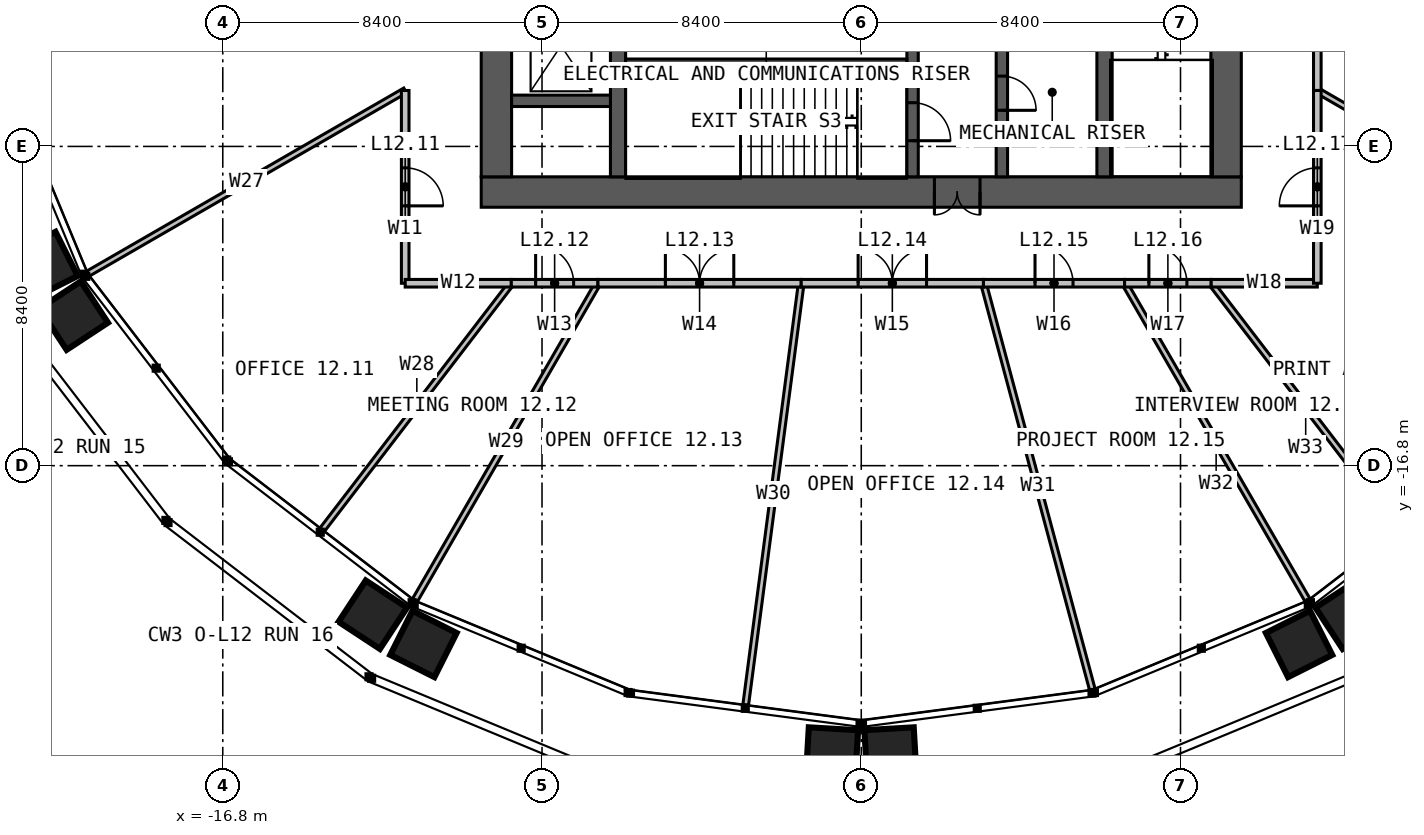
"""IFC4 building model, lengths in metres.
Left out: names, types, materials, properties, quantities, classifications, styles, units other than length and angle.
Written with IfcOpenShell. Run it as: python <this file> out.ifc"""

import sys

from ifc_helpers import new_model, si_unit, direction, frame, frame_2d, origin, place, context, subcontext, project, spatial, rectangle, extrude, element, fill, save


model = new_model("IFC4")
c1 = context("Model", 3, precision=1e-05, world=origin(), true_north=direction((0.0, 1.0)))
c2 = subcontext(c1, "Body", "Model", "MODEL_VIEW")
j1 = project(units=[si_unit("LENGTHUNIT", "METRE"), si_unit("PLANEANGLEUNIT", "RADIAN")], contexts=[c1])
p1 = place(None, origin())
s1 = spatial("IfcSite", under=j1, at=p1, CompositionType="ELEMENT")
p2 = place(p1, origin())
s2 = spatial("IfcBuilding", under=s1, at=p2, CompositionType="ELEMENT")
p3 = place(p2, frame((0.0, 0.0, 53.0)))
s3 = spatial("IfcBuildingStorey", under=s2, at=p3, CompositionType="ELEMENT", Elevation=53.0)
p4 = place(p3, frame((10.0, -9.6, 0.0), z_axis=(0.0, 0.0, 1.0), x_axis=(-1.0, 0.0, 0.0)))
e1 = element("IfcWall", 1, at=p4, inside=s3, PredefinedType="SOLIDWALL", context=c2, shape_type="SweptSolid", body=[
    extrude(rectangle(XDim=20.0, YDim=0.8, at=frame_2d((10.0, 0.0))), origin(), (0.0, 0.0, 1.0), 4.0),
])
p5 = place(p4, frame((6.875, 0.0, 0.0)))
e2 = element("IfcOpeningElement", 2, at=p5, cuts=e1, PredefinedType="OPENING", context=c2, shape_type="SweptSolid", body=[
    extrude(rectangle(XDim=1.2, YDim=2.2, at=frame_2d((0.6, 1.1))), frame((0.0, 0.41, 0.0), z_axis=(0.0, -1.0, 0.0), x_axis=(1.0, 0.0, 0.0)), (0.0, 0.0, 1.0), 0.82),
])
for number, where, z_axis, x_axis in (
    (3, (9.6, -9.2, 0.0), (0.0, 0.0, 1.0), (0.0, 1.0, 0.0)),
    (4, (-9.6, 9.2, 0.0), (0.0, 0.0, 1.0), (0.0, -1.0, 0.0)),
):
    element("IfcWall", number, at=place(p3, frame(where, z_axis=z_axis, x_axis=x_axis)), inside=s3, PredefinedType="SOLIDWALL", context=c2, shape_type="SweptSolid", body=[
        extrude(rectangle(XDim=18.4, YDim=0.8, at=frame_2d((9.2, 0.0))), origin(), (0.0, 0.0, 1.0), 4.0),
    ])
p6 = place(p3, frame((-6.4, -9.2, 0.0), z_axis=(0.0, 0.0, 1.0), x_axis=(0.0, 1.0, 0.0)))
e5 = element("IfcWall", 5, at=p6, inside=s3, PredefinedType="SOLIDWALL", context=c2, shape_type="SweptSolid", body=[
    extrude(rectangle(XDim=18.4, YDim=0.4, at=frame_2d((9.2, 0.0))), origin(), (0.0, 0.0, 1.0), 4.0),
])
p7 = place(p6, frame((8.7, 0.0, 0.0)))
e6 = element("IfcOpeningElement", 6, at=p7, cuts=e5, PredefinedType="OPENING", context=c2, shape_type="SweptSolid", body=[
    extrude(rectangle(XDim=1.0, YDim=2.2, at=frame_2d((0.5, 1.1))), frame((0.0, 0.21, 0.0), z_axis=(0.0, -1.0, 0.0), x_axis=(1.0, 0.0, 0.0)), (0.0, 0.0, 1.0), 0.42),
])
p8 = place(p3, frame((6.4, 9.2, 0.0), z_axis=(0.0, 0.0, 1.0), x_axis=(0.0, -1.0, 0.0)))
e7 = element("IfcWall", 7, at=p8, inside=s3, PredefinedType="SOLIDWALL", context=c2, shape_type="SweptSolid", body=[
    extrude(rectangle(XDim=18.4, YDim=0.4, at=frame_2d((9.2, 0.0))), origin(), (0.0, 0.0, 1.0), 4.0),
])
p9 = place(p8, frame((8.7, 0.0, 0.0)))
e8 = element("IfcOpeningElement", 8, at=p9, cuts=e7, PredefinedType="OPENING", context=c2, shape_type="SweptSolid", body=[
    extrude(rectangle(XDim=1.0, YDim=2.2, at=frame_2d((0.5, 1.1))), frame((0.0, 0.21, 0.0), z_axis=(0.0, -1.0, 0.0), x_axis=(1.0, 0.0, 0.0)), (0.0, 0.0, 1.0), 0.42),
])
p10 = place(p3, frame((1.35, -1.45, 0.0), z_axis=(0.0, 0.0, 1.0), x_axis=(0.0, -1.0, 0.0)))
e9 = element("IfcWall", 9, at=p10, inside=s3, PredefinedType="SOLIDWALL", context=c2, shape_type="SweptSolid", body=[
    extrude(rectangle(XDim=7.75, YDim=0.3, at=frame_2d((3.875, 0.0))), origin(), (0.0, 0.0, 1.0), 4.0),
])
p11 = place(p10, frame((5.8, 0.0, 0.0)))
e10 = element("IfcOpeningElement", 10, at=p11, cuts=e9, PredefinedType="OPENING", context=c2, shape_type="SweptSolid", body=[
    extrude(rectangle(XDim=1.0, YDim=2.2, at=frame_2d((0.5, 1.1))), frame((0.0, 0.16, 0.0), z_axis=(0.0, -1.0, 0.0), x_axis=(1.0, 0.0, 0.0)), (0.0, 0.0, 1.0), 0.32),
])
p12 = place(p10, frame((3.525, 0.0, 0.0)))
e11 = element("IfcOpeningElement", 11, at=p12, cuts=e9, PredefinedType="OPENING", context=c2, shape_type="SweptSolid", body=[
    extrude(rectangle(XDim=0.9, YDim=2.2, at=frame_2d((0.45, 1.1))), frame((0.0, 0.16, 0.0), z_axis=(0.0, -1.0, 0.0), x_axis=(1.0, 0.0, 0.0)), (0.0, 0.0, 1.0), 0.32),
])
p13 = place(p3, frame((3.7, -1.45, 0.0), z_axis=(0.0, 0.0, 1.0), x_axis=(0.0, -1.0, 0.0)))
e12 = element("IfcWall", 12, at=p13, inside=s3, PredefinedType="SOLIDWALL", context=c2, shape_type="SweptSolid", body=[
    extrude(rectangle(XDim=7.75, YDim=0.3, at=frame_2d((3.875, 0.0))), origin(), (0.0, 0.0, 1.0), 4.0),
])
p14 = place(p13, frame((5.1, 0.0, 0.0)))
e13 = element("IfcOpeningElement", 13, at=p14, cuts=e12, PredefinedType="OPENING", context=c2, shape_type="SweptSolid", body=[
    extrude(rectangle(XDim=0.9, YDim=2.2, at=frame_2d((0.45, 1.1))), frame((0.0, 0.16, 0.0), z_axis=(0.0, -1.0, 0.0), x_axis=(1.0, 0.0, 0.0)), (0.0, 0.0, 1.0), 0.32),
])
p15 = place(p3, frame((-6.2, -6.2, 0.0), z_axis=(0.0, 0.0, 1.0), x_axis=(1.0, 0.0, 0.0)))
e14 = element("IfcWall", 14, at=p15, inside=s3, PredefinedType="SOLIDWALL", context=c2, shape_type="SweptSolid", body=[
    extrude(rectangle(XDim=7.4, YDim=0.2, at=frame_2d((3.7, 0.0))), origin(), (0.0, 0.0, 1.0), 4.0),
])
p16 = place(p3, frame((-9.2, -7.2, 0.0), z_axis=(0.0, 0.0, 1.0), x_axis=(1.0, 0.0, 0.0)))
e15 = element("IfcWall", 15, at=p16, inside=s3, PredefinedType="SOLIDWALL", context=c2, shape_type="SweptSolid", body=[
    extrude(rectangle(XDim=2.6, YDim=0.3, at=frame_2d((1.3, 0.0))), origin(), (0.0, 0.0, 1.0), 4.0),
])
p17 = place(p3, frame((12.0, -6.928, 0.0), z_axis=(0.0, 0.0, 1.0), x_axis=(0.866030350715, -0.499991431567, 0.0)))
e16 = element("IfcWall", 16, at=p17, inside=s3, PredefinedType="PARTITIONING", context=c2, shape_type="SweptSolid", body=[
    extrude(rectangle(XDim=9.638, YDim=0.15, at=frame_2d((4.819, 0.0))), origin(), (0.0, 0.0, 1.0), 2.79),
])
p18 = place(p3, frame((-12.0, -3.215, 0.0), z_axis=(0.0, 0.0, 1.0), x_axis=(-0.965922753078, -0.258830514209, 0.0)))
e17 = element("IfcWall", 17, at=p18, inside=s3, PredefinedType="PARTITIONING", context=c2, shape_type="SweptSolid", body=[
    extrude(rectangle(XDim=11.071, YDim=0.15, at=frame_2d((5.535, 0.0))), origin(), (0.0, 0.0, 1.0), 2.79),
])
p19 = place(p3, frame((-12.0, -6.928, 0.0), z_axis=(0.0, 0.0, 1.0), x_axis=(-0.866030350715, -0.499991431567, 0.0)))
e18 = element("IfcWall", 18, at=p19, inside=s3, PredefinedType="PARTITIONING", context=c2, shape_type="SweptSolid", body=[
    extrude(rectangle(XDim=9.638, YDim=0.15, at=frame_2d((4.819, 0.0))), origin(), (0.0, 0.0, 1.0), 2.79),
])
p20 = place(p3, frame((-9.208, -12.0, 0.0), z_axis=(0.0, 0.0, 1.0), x_axis=(-0.608749658954, -0.793362371633, 0.0)))
e19 = element("IfcWall", 19, at=p20, inside=s3, PredefinedType="PARTITIONING", context=c2, shape_type="SweptSolid", body=[
    extrude(rectangle(XDim=8.167, YDim=0.15, at=frame_2d((4.084, 0.0))), origin(), (0.0, 0.0, 1.0), 2.79),
])
p21 = place(p3, frame((-6.928, -12.0, 0.0), z_axis=(0.0, 0.0, 1.0), x_axis=(-0.499991431567, -0.866030350715, 0.0)))
e20 = element("IfcWall", 20, at=p21, inside=s3, PredefinedType="PARTITIONING", context=c2, shape_type="SweptSolid", body=[
    extrude(rectangle(XDim=9.638, YDim=0.15, at=frame_2d((4.819, 0.0))), origin(), (0.0, 0.0, 1.0), 2.79),
])
p22 = place(p3, frame((-1.58, -12.0, 0.0), z_axis=(0.0, 0.0, 1.0), x_axis=(-0.130517160134, -0.991446050429, 0.0)))
e21 = element("IfcWall", 21, at=p22, inside=s3, PredefinedType="PARTITIONING", context=c2, shape_type="SweptSolid", body=[
    extrude(rectangle(XDim=11.19, YDim=0.15, at=frame_2d((5.595, 0.0))), origin(), (0.0, 0.0, 1.0), 2.79),
])
p23 = place(p3, frame((3.215, -12.0, 0.0), z_axis=(0.0, 0.0, 1.0), x_axis=(0.258830514209, -0.965922753078, 0.0)))
e22 = element("IfcWall", 22, at=p23, inside=s3, PredefinedType="PARTITIONING", context=c2, shape_type="SweptSolid", body=[
    extrude(rectangle(XDim=11.071, YDim=0.15, at=frame_2d((5.535, 0.0))), origin(), (0.0, 0.0, 1.0), 2.79),
])
p24 = place(p3, frame((6.928, -12.0, 0.0), z_axis=(0.0, 0.0, 1.0), x_axis=(0.499991431567, -0.866030350715, 0.0)))
e23 = element("IfcWall", 23, at=p24, inside=s3, PredefinedType="PARTITIONING", context=c2, shape_type="SweptSolid", body=[
    extrude(rectangle(XDim=9.638, YDim=0.15, at=frame_2d((4.819, 0.0))), origin(), (0.0, 0.0, 1.0), 2.79),
])
p25 = place(p3, frame((9.208, -12.0, 0.0), z_axis=(0.0, 0.0, 1.0), x_axis=(0.608749658954, -0.793362371633, 0.0)))
e24 = element("IfcWall", 24, at=p25, inside=s3, PredefinedType="PARTITIONING", context=c2, shape_type="SweptSolid", body=[
    extrude(rectangle(XDim=8.167, YDim=0.15, at=frame_2d((4.084, 0.0))), origin(), (0.0, 0.0, 1.0), 2.79),
])
p26 = place(p3, frame((12.0, -6.928, 0.0), z_axis=(0.0, 0.0, 1.0), x_axis=(0.0, 1.0, 0.0)))
e25 = element("IfcWall", 25, at=p26, inside=s3, PredefinedType="PARTITIONING", context=c2, shape_type="SweptSolid", body=[
    extrude(rectangle(XDim=5.348, YDim=0.2, at=frame_2d((2.674, 0.0))), origin(), (0.0, 0.0, 1.0), 3.8),
])
p27 = place(p26, frame((1.774, 0.0, 0.0)))
e26 = element("IfcOpeningElement", 26, at=p27, cuts=e25, PredefinedType="OPENING", context=c2, shape_type="SweptSolid", body=[
    extrude(rectangle(XDim=1.8, YDim=2.2, at=frame_2d((0.9, 1.1))), frame((0.0, 0.11, 0.0), z_axis=(0.0, -1.0, 0.0), x_axis=(1.0, 0.0, 0.0)), (0.0, 0.0, 1.0), 0.22),
])
p28 = place(p3, frame((-12.0, -6.928, 0.0), z_axis=(0.0, 0.0, 1.0), x_axis=(0.0, -1.0, 0.0)))
e27 = element("IfcWall", 27, at=p28, inside=s3, PredefinedType="PARTITIONING", context=c2, shape_type="SweptSolid", body=[
    extrude(rectangle(XDim=5.072, YDim=0.2, at=frame_2d((2.536, 0.0))), origin(), (0.0, 0.0, 1.0), 3.8),
])
p29 = place(p28, frame((2.036, 0.0, 0.0)))
e28 = element("IfcOpeningElement", 28, at=p29, cuts=e27, PredefinedType="OPENING", context=c2, shape_type="SweptSolid", body=[
    extrude(rectangle(XDim=1.0, YDim=2.2, at=frame_2d((0.5, 1.1))), frame((0.0, 0.11, 0.0), z_axis=(0.0, -1.0, 0.0), x_axis=(1.0, 0.0, 0.0)), (0.0, 0.0, 1.0), 0.22),
])
p30 = place(p3, frame((-12.0, -12.0, 0.0), z_axis=(0.0, 0.0, 1.0), x_axis=(1.0, 0.0, 0.0)))
e29 = element("IfcWall", 29, at=p30, inside=s3, PredefinedType="PARTITIONING", context=c2, shape_type="SweptSolid", body=[
    extrude(rectangle(XDim=2.792, YDim=0.2, at=frame_2d((1.396, 0.0))), origin(), (0.0, 0.0, 1.0), 3.8),
])
p31 = place(p3, frame((-9.208, -12.0, 0.0), z_axis=(0.0, 0.0, 1.0), x_axis=(1.0, 0.0, 0.0)))
e30 = element("IfcWall", 30, at=p31, inside=s3, PredefinedType="PARTITIONING", context=c2, shape_type="SweptSolid", body=[
    extrude(rectangle(XDim=2.28, YDim=0.2, at=frame_2d((1.14, 0.0))), origin(), (0.0, 0.0, 1.0), 3.8),
])
p32 = place(p31, frame((0.64, 0.0, 0.0)))
e31 = element("IfcOpeningElement", 31, at=p32, cuts=e30, PredefinedType="OPENING", context=c2, shape_type="SweptSolid", body=[
    extrude(rectangle(XDim=1.0, YDim=2.2, at=frame_2d((0.5, 1.1))), frame((0.0, 0.11, 0.0), z_axis=(0.0, -1.0, 0.0), x_axis=(1.0, 0.0, 0.0)), (0.0, 0.0, 1.0), 0.22),
])
p33 = place(p3, frame((-6.928, -12.0, 0.0), z_axis=(0.0, 0.0, 1.0), x_axis=(1.0, 0.0, 0.0)))
e32 = element("IfcWall", 32, at=p33, inside=s3, PredefinedType="PARTITIONING", context=c2, shape_type="SweptSolid", body=[
    extrude(rectangle(XDim=5.348, YDim=0.2, at=frame_2d((2.674, 0.0))), origin(), (0.0, 0.0, 1.0), 3.8),
])
p34 = place(p33, frame((1.774, 0.0, 0.0)))
e33 = element("IfcOpeningElement", 33, at=p34, cuts=e32, PredefinedType="OPENING", context=c2, shape_type="SweptSolid", body=[
    extrude(rectangle(XDim=1.8, YDim=2.2, at=frame_2d((0.9, 1.1))), frame((0.0, 0.11, 0.0), z_axis=(0.0, -1.0, 0.0), x_axis=(1.0, 0.0, 0.0)), (0.0, 0.0, 1.0), 0.22),
])
p35 = place(p3, frame((-1.58, -12.0, 0.0), z_axis=(0.0, 0.0, 1.0), x_axis=(1.0, 0.0, 0.0)))
e34 = element("IfcWall", 34, at=p35, inside=s3, PredefinedType="PARTITIONING", context=c2, shape_type="SweptSolid", body=[
    extrude(rectangle(XDim=4.795, YDim=0.2, at=frame_2d((2.397, 0.0))), origin(), (0.0, 0.0, 1.0), 3.8),
])
p36 = place(p35, frame((1.498, 0.0, 0.0)))
e35 = element("IfcOpeningElement", 35, at=p36, cuts=e34, PredefinedType="OPENING", context=c2, shape_type="SweptSolid", body=[
    extrude(rectangle(XDim=1.8, YDim=2.2, at=frame_2d((0.9, 1.1))), frame((0.0, 0.11, 0.0), z_axis=(0.0, -1.0, 0.0), x_axis=(1.0, 0.0, 0.0)), (0.0, 0.0, 1.0), 0.22),
])
p37 = place(p3, frame((3.215, -12.0, 0.0), z_axis=(0.0, 0.0, 1.0), x_axis=(1.0, 0.0, 0.0)))
e36 = element("IfcWall", 36, at=p37, inside=s3, PredefinedType="PARTITIONING", context=c2, shape_type="SweptSolid", body=[
    extrude(rectangle(XDim=3.713, YDim=0.2, at=frame_2d((1.856, 0.0))), origin(), (0.0, 0.0, 1.0), 3.8),
])
p38 = place(p37, frame((1.356, 0.0, 0.0)))
e37 = element("IfcOpeningElement", 37, at=p38, cuts=e36, PredefinedType="OPENING", context=c2, shape_type="SweptSolid", body=[
    extrude(rectangle(XDim=1.0, YDim=2.2, at=frame_2d((0.5, 1.1))), frame((0.0, 0.11, 0.0), z_axis=(0.0, -1.0, 0.0), x_axis=(1.0, 0.0, 0.0)), (0.0, 0.0, 1.0), 0.22),
])
p39 = place(p3, frame((6.928, -12.0, 0.0), z_axis=(0.0, 0.0, 1.0), x_axis=(1.0, 0.0, 0.0)))
e38 = element("IfcWall", 38, at=p39, inside=s3, PredefinedType="PARTITIONING", context=c2, shape_type="SweptSolid", body=[
    extrude(rectangle(XDim=2.28, YDim=0.2, at=frame_2d((1.14, 0.0))), origin(), (0.0, 0.0, 1.0), 3.8),
])
p40 = place(p39, frame((0.64, 0.0, 0.0)))
e39 = element("IfcOpeningElement", 39, at=p40, cuts=e38, PredefinedType="OPENING", context=c2, shape_type="SweptSolid", body=[
    extrude(rectangle(XDim=1.0, YDim=2.2, at=frame_2d((0.5, 1.1))), frame((0.0, 0.11, 0.0), z_axis=(0.0, -1.0, 0.0), x_axis=(1.0, 0.0, 0.0)), (0.0, 0.0, 1.0), 0.22),
])
p41 = place(p3, frame((9.208, -12.0, 0.0), z_axis=(0.0, 0.0, 1.0), x_axis=(1.0, 0.0, 0.0)))
e40 = element("IfcWall", 40, at=p41, inside=s3, PredefinedType="PARTITIONING", context=c2, shape_type="SweptSolid", body=[
    extrude(rectangle(XDim=2.792, YDim=0.2, at=frame_2d((1.396, 0.0))), origin(), (0.0, 0.0, 1.0), 3.8),
])
p42 = place(p3, frame((12.0, -12.0, 0.0), z_axis=(0.0, 0.0, 1.0), x_axis=(0.0, 1.0, 0.0)))
e41 = element("IfcWall", 41, at=p42, inside=s3, PredefinedType="PARTITIONING", context=c2, shape_type="SweptSolid", body=[
    extrude(rectangle(XDim=5.072, YDim=0.2, at=frame_2d((2.536, 0.0))), origin(), (0.0, 0.0, 1.0), 3.8),
])
p43 = place(p42, frame((2.036, 0.0, 0.0)))
e42 = element("IfcOpeningElement", 42, at=p43, cuts=e41, PredefinedType="OPENING", context=c2, shape_type="SweptSolid", body=[
    extrude(rectangle(XDim=1.0, YDim=2.2, at=frame_2d((0.5, 1.1))), frame((0.0, 0.11, 0.0), z_axis=(0.0, -1.0, 0.0), x_axis=(1.0, 0.0, 0.0)), (0.0, 0.0, 1.0), 0.22),
])
p44 = place(p5, origin())
e43 = element("IfcDoor", 43, at=p44, inside=s3, OperationType="DOUBLE_DOOR_SINGLE_SWING", PredefinedType="DOOR", context=c2, shape_type="SweptSolid", body=[
    extrude(rectangle(XDim=1.2, YDim=2.2, at=frame_2d((0.6, 1.1))), frame((0.0, 0.025, 0.0), z_axis=(0.0, -1.0, 0.0), x_axis=(1.0, 0.0, 0.0)), (0.0, 0.0, 1.0), 0.05),
])
fill(e2, e43)
p45 = place(p11, origin())
e44 = element("IfcDoor", 44, at=p45, inside=s3, OperationType="SINGLE_SWING_RIGHT", PredefinedType="DOOR", context=c2, shape_type="SweptSolid", body=[
    extrude(rectangle(XDim=1.0, YDim=2.2, at=frame_2d((0.5, 1.1))), frame((0.0, 0.025, 0.0), z_axis=(0.0, -1.0, 0.0), x_axis=(1.0, 0.0, 0.0)), (0.0, 0.0, 1.0), 0.05),
])
fill(e10, e44)
p46 = place(p14, origin())
e45 = element("IfcDoor", 45, at=p46, inside=s3, OperationType="SINGLE_SWING_RIGHT", PredefinedType="DOOR", context=c2, shape_type="SweptSolid", body=[
    extrude(rectangle(XDim=0.9, YDim=2.2, at=frame_2d((0.45, 1.1))), frame((0.0, 0.025, 0.0), z_axis=(0.0, -1.0, 0.0), x_axis=(1.0, 0.0, 0.0)), (0.0, 0.0, 1.0), 0.05),
])
fill(e13, e45)
p47 = place(p29, origin())
e46 = element("IfcDoor", 46, at=p47, inside=s3, OperationType="SINGLE_SWING_RIGHT", PredefinedType="DOOR", context=c2, shape_type="SweptSolid", body=[
    extrude(rectangle(XDim=1.0, YDim=2.2, at=frame_2d((0.5, 1.1))), frame((0.0, 0.025, 0.0), z_axis=(0.0, -1.0, 0.0), x_axis=(1.0, 0.0, 0.0)), (0.0, 0.0, 1.0), 0.05),
])
fill(e28, e46)
p48 = place(p32, origin())
e47 = element("IfcDoor", 47, at=p48, inside=s3, OperationType="SINGLE_SWING_LEFT", PredefinedType="DOOR", context=c2, shape_type="SweptSolid", body=[
    extrude(rectangle(XDim=1.0, YDim=2.2, at=frame_2d((0.5, 1.1))), frame((0.0, 0.025, 0.0), z_axis=(0.0, -1.0, 0.0), x_axis=(1.0, 0.0, 0.0)), (0.0, 0.0, 1.0), 0.05),
])
fill(e31, e47)
p49 = place(p34, origin())
e48 = element("IfcDoor", 48, at=p49, inside=s3, OperationType="DOUBLE_DOOR_SINGLE_SWING", PredefinedType="DOOR", context=c2, shape_type="SweptSolid", body=[
    extrude(rectangle(XDim=1.8, YDim=2.2, at=frame_2d((0.9, 1.1))), frame((0.0, 0.025, 0.0), z_axis=(0.0, -1.0, 0.0), x_axis=(1.0, 0.0, 0.0)), (0.0, 0.0, 1.0), 0.05),
])
fill(e33, e48)
p50 = place(p36, origin())
e49 = element("IfcDoor", 49, at=p50, inside=s3, OperationType="DOUBLE_DOOR_SINGLE_SWING", PredefinedType="DOOR", context=c2, shape_type="SweptSolid", body=[
    extrude(rectangle(XDim=1.8, YDim=2.2, at=frame_2d((0.9, 1.1))), frame((0.0, 0.025, 0.0), z_axis=(0.0, -1.0, 0.0), x_axis=(1.0, 0.0, 0.0)), (0.0, 0.0, 1.0), 0.05),
])
fill(e35, e49)
p51 = place(p38, origin())
e50 = element("IfcDoor", 50, at=p51, inside=s3, OperationType="SINGLE_SWING_LEFT", PredefinedType="DOOR", context=c2, shape_type="SweptSolid", body=[
    extrude(rectangle(XDim=1.0, YDim=2.2, at=frame_2d((0.5, 1.1))), frame((0.0, 0.025, 0.0), z_axis=(0.0, -1.0, 0.0), x_axis=(1.0, 0.0, 0.0)), (0.0, 0.0, 1.0), 0.05),
])
fill(e37, e50)
p52 = place(p40, origin())
e51 = element("IfcDoor", 51, at=p52, inside=s3, OperationType="SINGLE_SWING_LEFT", PredefinedType="DOOR", context=c2, shape_type="SweptSolid", body=[
    extrude(rectangle(XDim=1.0, YDim=2.2, at=frame_2d((0.5, 1.1))), frame((0.0, 0.025, 0.0), z_axis=(0.0, -1.0, 0.0), x_axis=(1.0, 0.0, 0.0)), (0.0, 0.0, 1.0), 0.05),
])
fill(e39, e51)
p53 = place(p43, origin())
e52 = element("IfcDoor", 52, at=p53, inside=s3, OperationType="SINGLE_SWING_LEFT", PredefinedType="DOOR", context=c2, shape_type="SweptSolid", body=[
    extrude(rectangle(XDim=1.0, YDim=2.2, at=frame_2d((0.5, 1.1))), frame((0.0, 0.025, 0.0), z_axis=(0.0, -1.0, 0.0), x_axis=(1.0, 0.0, 0.0)), (0.0, 0.0, 1.0), 0.05),
])
fill(e42, e52)
save(model, sys.argv[1])
